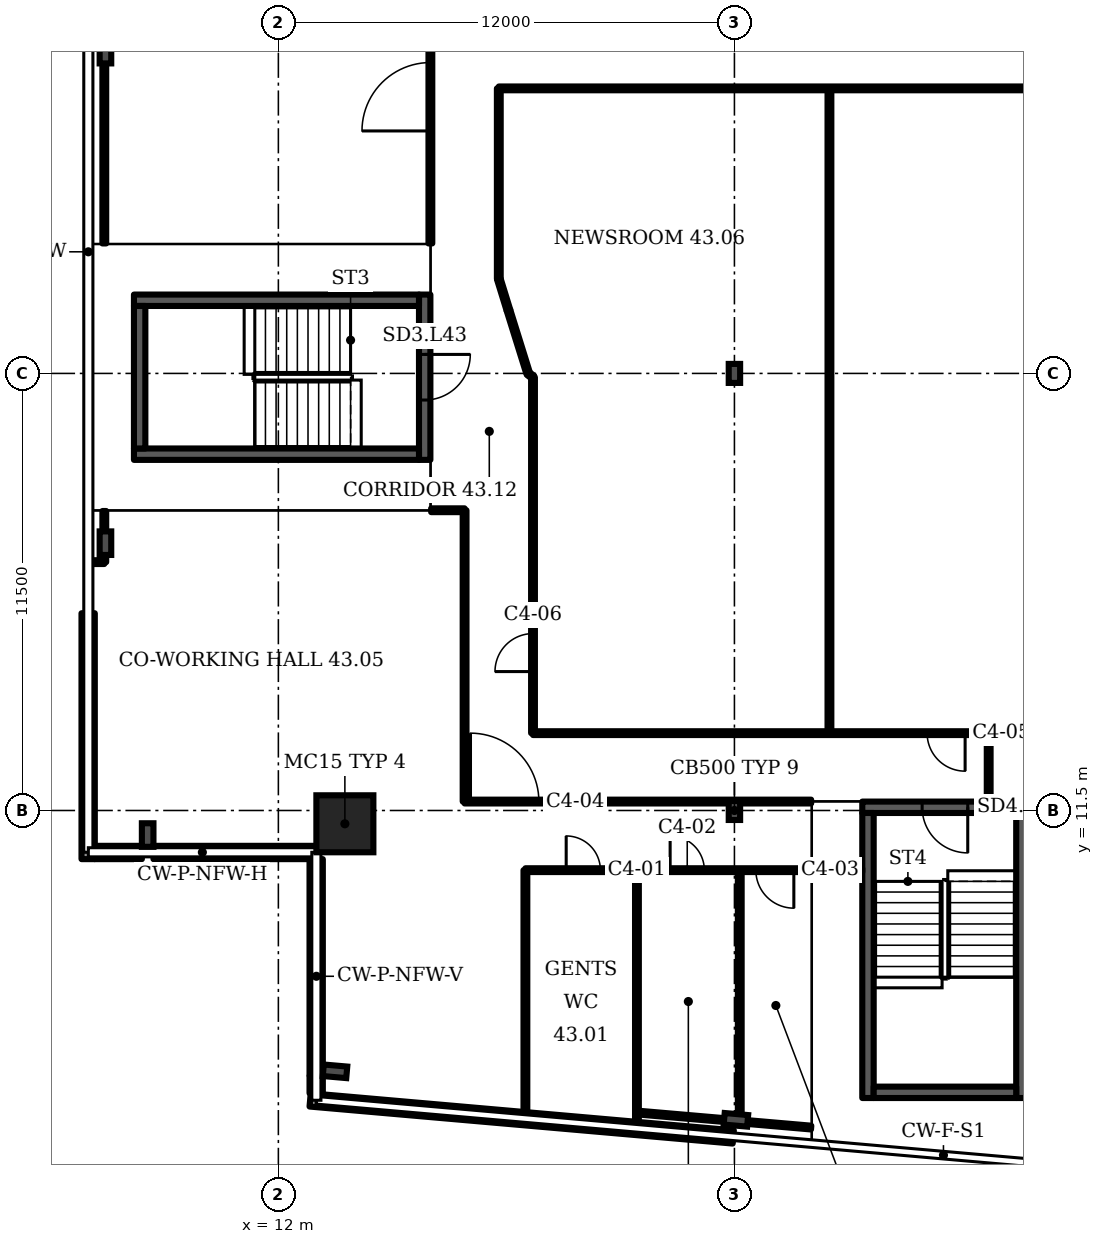
"""IFC4 building model, lengths in metres.
Left out: names, types, materials, properties, quantities, classifications, styles, units other than length and angle.
Written with IfcOpenShell. Run it as: python <this file> out.ifc"""

import sys

from ifc_helpers import new_model, si_unit, direction, frame, frame_2d, origin, origin_2d, place, context, subcontext, project, spatial, rectangle, i_section, extrude, element, fill, save


model = new_model("IFC4")
c1 = context("Model", 3, precision=1e-05, world=origin(), true_north=direction((0.0, 1.0)))
c2 = subcontext(c1, "Body", "Model", "MODEL_VIEW")
j1 = project(units=[si_unit("LENGTHUNIT", "METRE"), si_unit("PLANEANGLEUNIT", "RADIAN")], contexts=[c1])
p1 = place(None, origin())
s1 = spatial("IfcSite", under=j1, at=p1, CompositionType="ELEMENT")
p2 = place(p1, origin())
s2 = spatial("IfcBuilding", under=s1, at=p2, CompositionType="ELEMENT")
p3 = place(p2, frame((0.0, 0.0, 177.1)))
s3 = spatial("IfcBuildingStorey", under=s2, at=p3, CompositionType="ELEMENT", Elevation=177.1)
p4 = place(p3, frame((13.75, 11.15, 0.0), z_axis=(0.0, 0.0, 1.0), x_axis=(1.0, 0.0, 0.0)))
e1 = element("IfcColumn", 1, at=p4, inside=s3, PredefinedType="COLUMN", context=c2, shape_type="SweptSolid", body=[
    extrude(rectangle(XDim=1.5, YDim=1.5, at=origin_2d()), origin(), (0.0, 0.0, 1.0), 3.6),
])
for number, where, z_axis, x_axis in (
    (2, (13.491, 4.637, 0.0), (0.0, 0.0, 1.0), (-0.087, -0.996, 0.0)),
    (3, (24.039, 3.361, 0.0), (0.0, 0.0, 1.0), (-0.087, -0.996, 0.0)),
    (4, (7.45, 31.467, 0.0), (0.0, 0.0, 1.0), (-1.0, 0.0, 0.0)),
    (5, (7.45, 18.533, 0.0), (0.0, 0.0, 1.0), (-1.0, 0.0, 0.0)),
    (6, (8.561, 10.854, 0.0), (0.0, 0.0, 1.0), (-1.0, 0.0, 0.0)),
):
    element("IfcColumn", number, at=place(p3, frame(where, z_axis=z_axis, x_axis=x_axis)), inside=s3, PredefinedType="COLUMN", context=c2, shape_type="SweptSolid", body=[
        extrude(i_section(OverallWidth=0.305, OverallDepth=0.62, WebThickness=0.021, FlangeThickness=0.04, FilletRadius=0.027, at=origin_2d()), origin(), (0.0, 0.0, 1.0), 3.6),
    ])
for number, where, z_axis, x_axis in (
    (7, (24.0, 11.5, 0.0), (0.0, 0.0, 1.0), (1.0, 0.0, 0.0)),
    (8, (24.0, 23.0, 0.0), (0.0, 0.0, 1.0), (1.0, 0.0, 0.0)),
):
    element("IfcColumn", number, at=place(p3, frame(where, z_axis=z_axis, x_axis=x_axis)), inside=s3, PredefinedType="COLUMN", context=c2, shape_type="SweptSolid", body=[
        extrude(i_section(OverallWidth=0.3, OverallDepth=0.5, WebThickness=0.014, FlangeThickness=0.028, FilletRadius=0.027, at=origin_2d()), origin(), (0.0, 0.0, 1.0), 3.6),
    ])
p5 = place(p3, frame((12.835, 3.885, 0.0), z_axis=(0.0, 0.0, 1.0), x_axis=(0.996199, -0.087154, 0.0)))
e9 = element("IfcWall", 9, at=p5, inside=s3, PredefinedType="SOLIDWALL", context=c2, shape_type="SweptSolid", body=[
    extrude(rectangle(XDim=11.177, YDim=0.35, at=frame_2d((5.588, 0.0))), origin(), (0.0, 0.0, 1.0), 1.0),
])
p6 = place(p3, frame((6.995, 16.69, 0.0), z_axis=(0.0, 0.0, 1.0), x_axis=(0.0, -1.0, 0.0)))
e10 = element("IfcWall", 10, at=p6, inside=s3, PredefinedType="SOLIDWALL", context=c2, shape_type="SweptSolid", body=[
    extrude(rectangle(XDim=6.47, YDim=0.35, at=frame_2d((3.235, 0.0))), origin(), (0.0, 0.0, 1.0), 1.0),
])
p7 = place(p3, frame((7.17, 10.395, 0.0), z_axis=(0.0, 0.0, 1.0), x_axis=(1.0, 0.0, 0.0)))
e11 = element("IfcWall", 11, at=p7, inside=s3, PredefinedType="SOLIDWALL", context=c2, shape_type="SweptSolid", body=[
    extrude(rectangle(XDim=1.238, YDim=0.35, at=frame_2d((0.619, 0.0))), origin(), (0.0, 0.0, 1.0), 1.0),
])
p8 = place(p3, frame((8.713, 10.395, 0.0), z_axis=(0.0, 0.0, 1.0), x_axis=(1.0, 0.0, 0.0)))
e12 = element("IfcWall", 12, at=p8, inside=s3, PredefinedType="SOLIDWALL", context=c2, shape_type="SweptSolid", body=[
    extrude(rectangle(XDim=4.287, YDim=0.35, at=frame_2d((2.143, 0.0))), origin(), (0.0, 0.0, 1.0), 1.0),
])
p9 = place(p3, frame((12.995, 10.22, 0.0), z_axis=(0.0, 0.0, 1.0), x_axis=(0.0, -1.0, 0.0)))
e13 = element("IfcWall", 13, at=p9, inside=s3, PredefinedType="SOLIDWALL", context=c2, shape_type="SweptSolid", body=[
    extrude(rectangle(XDim=5.693, YDim=0.35, at=frame_2d((2.847, 0.0))), origin(), (0.0, 0.0, 1.0), 1.0),
])
p10 = place(p3, frame((12.995, 4.512, 0.0), z_axis=(0.0, 0.0, 1.0), x_axis=(0.0, -1.0, 0.0)))
e14 = element("IfcWall", 14, at=p10, inside=s3, PredefinedType="SOLIDWALL", context=c2, shape_type="SweptSolid", body=[
    extrude(rectangle(XDim=0.454, YDim=0.35, at=frame_2d((0.227, 0.0))), origin(), (0.0, 0.0, 1.0), 1.0),
])
p11 = place(p3, frame((15.85, 20.725, 0.0), z_axis=(0.0, 0.0, 1.0), x_axis=(0.0, 1.0, 0.0)))
e15 = element("IfcWall", 15, at=p11, inside=s3, PredefinedType="SHEAR", context=c2, shape_type="SweptSolid", body=[
    extrude(rectangle(XDim=4.35, YDim=0.3, at=frame_2d((2.175, 0.0))), origin(), (0.0, 0.0, 1.0), 3.2),
])
p12 = place(p11, frame((1.575, 0.0, 0.0)))
e16 = element("IfcOpeningElement", 16, at=p12, cuts=e15, PredefinedType="OPENING", context=c2, shape_type="SweptSolid", body=[
    extrude(rectangle(XDim=1.2, YDim=2.1, at=frame_2d((0.6, 1.05))), frame((0.0, 0.16, 0.0), z_axis=(0.0, -1.0, 0.0), x_axis=(1.0, 0.0, 0.0)), (0.0, 0.0, 1.0), 0.32),
])
p13 = place(p3, frame((27.364, 11.584, 0.0), z_axis=(0.0, 0.0, 1.0), x_axis=(1.0, 0.0, 0.0)))
e17 = element("IfcWall", 17, at=p13, inside=s3, PredefinedType="SHEAR", context=c2, shape_type="SweptSolid", body=[
    extrude(rectangle(XDim=4.35, YDim=0.3, at=frame_2d((2.175, 0.0))), origin(), (0.0, 0.0, 1.0), 3.2),
])
p14 = place(p13, frame((1.575, 0.0, 0.0)))
e18 = element("IfcOpeningElement", 18, at=p14, cuts=e17, PredefinedType="OPENING", context=c2, shape_type="SweptSolid", body=[
    extrude(rectangle(XDim=1.2, YDim=2.1, at=frame_2d((0.6, 1.05))), frame((0.0, 0.16, 0.0), z_axis=(0.0, -1.0, 0.0), x_axis=(1.0, 0.0, 0.0)), (0.0, 0.0, 1.0), 0.32),
])
p15 = place(p3, frame((7.02, 18.035, 0.0), z_axis=(0.0, 0.0, 1.0), x_axis=(1.0, 0.0, 0.0)))
e19 = element("IfcWall", 19, at=p15, inside=s3, PredefinedType="PARTITIONING", context=c2, shape_type="SweptSolid", body=[
    extrude(rectangle(XDim=0.4, YDim=0.1, at=frame_2d((0.2, 0.0))), origin(), (0.0, 0.0, 1.0), 3.2),
])
p16 = place(p3, frame((7.42, 18.035, 0.0), z_axis=(0.0, 0.0, 1.0), x_axis=(0.0, 1.0, 0.0)))
e20 = element("IfcWall", 20, at=p16, inside=s3, PredefinedType="PARTITIONING", context=c2, shape_type="SweptSolid", body=[
    extrude(rectangle(XDim=1.345, YDim=0.1, at=frame_2d((0.672, 0.0))), origin(), (0.0, 0.0, 1.0), 2.58),
])
p17 = place(p3, frame((7.42, 26.42, 0.0), z_axis=(0.0, 0.0, 1.0), x_axis=(0.0, 1.0, 0.0)))
e21 = element("IfcWall", 21, at=p17, inside=s3, PredefinedType="PARTITIONING", context=c2, shape_type="SweptSolid", body=[
    extrude(rectangle(XDim=15.56, YDim=0.1, at=frame_2d((7.78, 0.0))), origin(), (0.0, 0.0, 1.0), 2.58),
])
p18 = place(p3, frame((16.0, 26.42, 0.0), z_axis=(0.0, 0.0, 1.0), x_axis=(0.0, 1.0, 0.0)))
e22 = element("IfcWall", 22, at=p18, inside=s3, PredefinedType="PARTITIONING", context=c2, shape_type="SweptSolid", body=[
    extrude(rectangle(XDim=7.56, YDim=0.1, at=frame_2d((3.78, 0.0))), origin(), (0.0, 0.0, 1.0), 3.2),
])
p19 = place(p18, frame((2.96, 0.0, 0.0)))
e23 = element("IfcOpeningElement", 23, at=p19, cuts=e22, PredefinedType="OPENING", context=c2, shape_type="SweptSolid", body=[
    extrude(rectangle(XDim=1.8, YDim=2.1, at=frame_2d((0.9, 1.05))), frame((0.0, 0.06, 0.0), z_axis=(0.0, -1.0, 0.0), x_axis=(1.0, 0.0, 0.0)), (0.0, 0.0, 1.0), 0.12),
])
p20 = place(p3, frame((16.02, 19.4, 0.0), z_axis=(0.0, 0.0, 1.0), x_axis=(1.0, 0.0, 0.0)))
e24 = element("IfcWall", 24, at=p20, inside=s3, PredefinedType="PARTITIONING", context=c2, shape_type="SweptSolid", body=[
    extrude(rectangle(XDim=0.88, YDim=0.1, at=frame_2d((0.44, 0.0))), origin(), (0.0, 0.0, 1.0), 3.2),
])
p21 = place(p3, frame((16.9, 11.735, 0.0), z_axis=(0.0, 0.0, 1.0), x_axis=(0.0, 1.0, 0.0)))
e25 = element("IfcWall", 25, at=p21, inside=s3, PredefinedType="PARTITIONING", context=c2, shape_type="SweptSolid", body=[
    extrude(rectangle(XDim=7.665, YDim=0.1, at=frame_2d((3.833, 0.0))), origin(), (0.0, 0.0, 1.0), 3.2),
])
p22 = place(p3, frame((16.9, 11.735, 0.0), z_axis=(0.0, 0.0, 1.0), x_axis=(1.0, 0.0, 0.0)))
e26 = element("IfcWall", 26, at=p22, inside=s3, PredefinedType="PARTITIONING", context=c2, shape_type="SweptSolid", body=[
    extrude(rectangle(XDim=9.119, YDim=0.1, at=frame_2d((4.56, 0.0))), origin(), (0.0, 0.0, 1.0), 3.2),
])
p23 = place(p22, frame((0.155, 0.0, 0.0)))
e27 = element("IfcOpeningElement", 27, at=p23, cuts=e26, PredefinedType="OPENING", context=c2, shape_type="SweptSolid", body=[
    extrude(rectangle(XDim=1.8, YDim=2.1, at=frame_2d((0.9, 1.05))), frame((0.0, 0.06, 0.0), z_axis=(0.0, -1.0, 0.0), x_axis=(1.0, 0.0, 0.0)), (0.0, 0.0, 1.0), 0.12),
])
p24 = place(p3, frame((17.8, 25.485, 0.0), z_axis=(0.0, 0.0, 1.0), x_axis=(0.0, 1.0, 0.0)))
e28 = element("IfcWall", 28, at=p24, inside=s3, PredefinedType="PARTITIONING", context=c2, shape_type="SweptSolid", body=[
    extrude(rectangle(XDim=5.015, YDim=0.1, at=frame_2d((2.507, 0.0))), origin(), (0.0, 0.0, 1.0), 3.2),
])
p25 = place(p3, frame((17.8, 30.5, 0.0), z_axis=(0.0, 0.0, 1.0), x_axis=(1.0, 0.0, 0.0)))
e29 = element("IfcWall", 29, at=p25, inside=s3, PredefinedType="PARTITIONING", context=c2, shape_type="SweptSolid", body=[
    extrude(rectangle(XDim=19.05, YDim=0.1, at=frame_2d((9.525, 0.0))), origin(), (0.0, 0.0, 1.0), 3.2),
])
p26 = place(p3, frame((18.055, 24.66, 0.0), z_axis=(0.0, 0.0, 1.0), x_axis=(-0.295119, 0.955462, 0.0)))
e30 = element("IfcWall", 30, at=p26, inside=s3, PredefinedType="PARTITIONING", context=c2, shape_type="SweptSolid", body=[
    extrude(rectangle(XDim=0.864, YDim=0.1, at=frame_2d((0.432, 0.0))), origin(), (0.0, 0.0, 1.0), 3.2),
])
p27 = place(p3, frame((18.5, 3.414, 0.0), z_axis=(0.0, 0.0, 1.0), x_axis=(0.0, 1.0, 0.0)))
e31 = element("IfcWall", 31, at=p27, inside=s3, PredefinedType="PARTITIONING", context=c2, shape_type="SweptSolid", body=[
    extrude(rectangle(XDim=6.516, YDim=0.1, at=frame_2d((3.258, 0.0))), origin(), (0.0, 0.0, 1.0), 2.58),
])
p28 = place(p3, frame((18.5, 9.93, 0.0), z_axis=(0.0, 0.0, 1.0), x_axis=(1.0, 0.0, 0.0)))
e32 = element("IfcWall", 32, at=p28, inside=s3, PredefinedType="PARTITIONING", context=c2, shape_type="SweptSolid", body=[
    extrude(rectangle(XDim=8.864, YDim=0.1, at=frame_2d((4.432, 0.0))), origin(), (0.0, 0.0, 1.0), 3.2),
])
p29 = place(p28, frame((1.073, 0.0, 0.0)))
e33 = element("IfcOpeningElement", 33, at=p29, cuts=e32, PredefinedType="OPENING", context=c2, shape_type="SweptSolid", body=[
    extrude(rectangle(XDim=0.9, YDim=2.1, at=frame_2d((0.45, 1.05))), frame((0.0, 0.06, 0.0), z_axis=(0.0, -1.0, 0.0), x_axis=(1.0, 0.0, 0.0)), (0.0, 0.0, 1.0), 0.12),
])
p30 = place(p28, frame((3.808, 0.0, 0.0)))
e34 = element("IfcOpeningElement", 34, at=p30, cuts=e32, PredefinedType="OPENING", context=c2, shape_type="SweptSolid", body=[
    extrude(rectangle(XDim=0.9, YDim=2.1, at=frame_2d((0.45, 1.05))), frame((0.0, 0.06, 0.0), z_axis=(0.0, -1.0, 0.0), x_axis=(1.0, 0.0, 0.0)), (0.0, 0.0, 1.0), 0.12),
])
p31 = place(p28, frame((6.063, 0.0, 0.0)))
e35 = element("IfcOpeningElement", 35, at=p31, cuts=e32, PredefinedType="OPENING", context=c2, shape_type="SweptSolid", body=[
    extrude(rectangle(XDim=1.0, YDim=2.1, at=frame_2d((0.5, 1.05))), frame((0.0, 0.06, 0.0), z_axis=(0.0, -1.0, 0.0), x_axis=(1.0, 0.0, 0.0)), (0.0, 0.0, 1.0), 0.12),
])
p32 = place(p3, frame((18.575, 22.995, 0.0), z_axis=(0.0, 0.0, 1.0), x_axis=(-0.298155, 0.954516, 0.0)))
e36 = element("IfcWall", 36, at=p32, inside=s3, PredefinedType="PARTITIONING", context=c2, shape_type="SweptSolid", body=[
    extrude(rectangle(XDim=1.744, YDim=0.1, at=frame_2d((0.872, 0.0))), origin(), (0.0, 0.0, 1.0), 3.2),
])
p33 = place(p3, frame((18.7, 22.9, 0.0), z_axis=(0.0, 0.0, 1.0), x_axis=(-0.795501, 0.605948, 0.0)))
e37 = element("IfcWall", 37, at=p33, inside=s3, PredefinedType="PARTITIONING", context=c2, shape_type="SweptSolid", body=[
    extrude(rectangle(XDim=0.157, YDim=0.1, at=frame_2d((0.079, 0.0))), origin(), (0.0, 0.0, 1.0), 3.2),
])
p34 = place(p3, frame((18.7, 13.535, 0.0), z_axis=(0.0, 0.0, 1.0), x_axis=(0.0, 1.0, 0.0)))
e38 = element("IfcWall", 38, at=p34, inside=s3, PredefinedType="PARTITIONING", context=c2, shape_type="SweptSolid", body=[
    extrude(rectangle(XDim=9.365, YDim=0.1, at=frame_2d((4.683, 0.0))), origin(), (0.0, 0.0, 1.0), 3.2),
])
p35 = place(p34, frame((1.62, 0.0, 0.0)))
e39 = element("IfcOpeningElement", 39, at=p35, cuts=e38, PredefinedType="OPENING", context=c2, shape_type="SweptSolid", body=[
    extrude(rectangle(XDim=1.0, YDim=2.1, at=frame_2d((0.5, 1.05))), frame((0.0, 0.06, 0.0), z_axis=(0.0, -1.0, 0.0), x_axis=(1.0, 0.0, 0.0)), (0.0, 0.0, 1.0), 0.12),
])
p36 = place(p3, frame((18.7, 13.535, 0.0), z_axis=(0.0, 0.0, 1.0), x_axis=(1.0, 0.0, 0.0)))
e40 = element("IfcWall", 40, at=p36, inside=s3, PredefinedType="PARTITIONING", context=c2, shape_type="SweptSolid", body=[
    extrude(rectangle(XDim=11.99, YDim=0.1, at=frame_2d((5.995, 0.0))), origin(), (0.0, 0.0, 1.0), 3.2),
])
p37 = place(p36, frame((10.37, 0.0, 0.0)))
e41 = element("IfcOpeningElement", 41, at=p37, cuts=e40, PredefinedType="OPENING", context=c2, shape_type="SweptSolid", body=[
    extrude(rectangle(XDim=1.0, YDim=2.1, at=frame_2d((0.5, 1.05))), frame((0.0, 0.06, 0.0), z_axis=(0.0, -1.0, 0.0), x_axis=(1.0, 0.0, 0.0)), (0.0, 0.0, 1.0), 0.12),
])
p38 = place(p3, frame((21.435, 3.165, 0.0), z_axis=(0.0, 0.0, 1.0), x_axis=(0.0, 1.0, 0.0)))
e42 = element("IfcWall", 42, at=p38, inside=s3, PredefinedType="PARTITIONING", context=c2, shape_type="SweptSolid", body=[
    extrude(rectangle(XDim=6.765, YDim=0.1, at=frame_2d((3.382, 0.0))), origin(), (0.0, 0.0, 1.0), 2.58),
])
p39 = place(p3, frame((24.14, 3.32, 0.0), z_axis=(0.0, 0.0, 1.0), x_axis=(0.0, 1.0, 0.0)))
e43 = element("IfcWall", 43, at=p39, inside=s3, PredefinedType="PARTITIONING", context=c2, shape_type="SweptSolid", body=[
    extrude(rectangle(XDim=6.61, YDim=0.1, at=frame_2d((3.305, 0.0))), origin(), (0.0, 0.0, 1.0), 3.2),
])
p40 = place(p3, frame((26.019, 3.157, 0.0), z_axis=(0.0, 0.0, 1.0), x_axis=(-0.996266, 0.086322, 0.0)))
e44 = element("IfcWall", 44, at=p40, inside=s3, PredefinedType="PARTITIONING", context=c2, shape_type="SweptSolid", body=[
    extrude(rectangle(XDim=4.556, YDim=0.1, at=frame_2d((2.278, 0.0))), origin(), (0.0, 0.0, 1.0), 2.58),
])
p41 = place(p3, frame((26.5, 13.535, 0.0), z_axis=(0.0, 0.0, 1.0), x_axis=(0.0, 1.0, 0.0)))
e45 = element("IfcWall", 45, at=p41, inside=s3, PredefinedType="PARTITIONING", context=c2, shape_type="SweptSolid", body=[
    extrude(rectangle(XDim=16.965, YDim=0.1, at=frame_2d((8.482, 0.0))), origin(), (0.0, 0.0, 1.0), 3.2),
])
p42 = place(p3, frame((30.69, 11.754, 0.0), z_axis=(0.0, 0.0, 1.0), x_axis=(0.0, 1.0, 0.0)))
e46 = element("IfcWall", 46, at=p42, inside=s3, PredefinedType="PARTITIONING", context=c2, shape_type="SweptSolid", body=[
    extrude(rectangle(XDim=1.781, YDim=0.1, at=frame_2d((0.89, 0.0))), origin(), (0.0, 0.0, 1.0), 3.2),
])
for number, where, z_axis, x_axis in (
    (47, (8.2, 20.875, 0.0), (0.0, 0.0, 1.0), (1.0, 0.0, 0.0)),
    (48, (8.2, 24.925, 0.0), (0.0, 0.0, 1.0), (1.0, 0.0, 0.0)),
):
    element("IfcWall", number, at=place(p3, frame(where, z_axis=z_axis, x_axis=x_axis)), inside=s3, PredefinedType="SHEAR", context=c2, shape_type="SweptSolid", body=[
        extrude(rectangle(XDim=7.5, YDim=0.3, at=frame_2d((3.75, 0.0))), origin(), (0.0, 0.0, 1.0), 3.2),
    ])
p43 = place(p3, frame((8.35, 21.025, 0.0), z_axis=(0.0, 0.0, 1.0), x_axis=(0.0, 1.0, 0.0)))
e49 = element("IfcWall", 49, at=p43, inside=s3, PredefinedType="SHEAR", context=c2, shape_type="SweptSolid", body=[
    extrude(rectangle(XDim=3.75, YDim=0.3, at=frame_2d((1.875, 0.0))), origin(), (0.0, 0.0, 1.0), 3.2),
])
for number, where, z_axis, x_axis in (
    (50, (27.514, 3.934, 0.0), (0.0, 0.0, 1.0), (0.0, 1.0, 0.0)),
    (51, (31.564, 3.934, 0.0), (0.0, 0.0, 1.0), (0.0, 1.0, 0.0)),
):
    element("IfcWall", number, at=place(p3, frame(where, z_axis=z_axis, x_axis=x_axis)), inside=s3, PredefinedType="SHEAR", context=c2, shape_type="SweptSolid", body=[
        extrude(rectangle(XDim=7.5, YDim=0.3, at=frame_2d((3.75, 0.0))), origin(), (0.0, 0.0, 1.0), 3.2),
    ])
p44 = place(p3, frame((27.664, 4.084, 0.0), z_axis=(0.0, 0.0, 1.0), x_axis=(1.0, 0.0, 0.0)))
e52 = element("IfcWall", 52, at=p44, inside=s3, PredefinedType="SHEAR", context=c2, shape_type="SweptSolid", body=[
    extrude(rectangle(XDim=3.75, YDim=0.3, at=frame_2d((1.875, 0.0))), origin(), (0.0, 0.0, 1.0), 3.2),
])
p45 = place(p12, origin())
e53 = element("IfcDoor", 53, at=p45, inside=s3, OperationType="SINGLE_SWING_RIGHT", PredefinedType="DOOR", context=c2, shape_type="SweptSolid", body=[
    extrude(rectangle(XDim=1.2, YDim=2.1, at=frame_2d((0.6, 1.05))), frame((0.0, 0.025, 0.0), z_axis=(0.0, -1.0, 0.0), x_axis=(1.0, 0.0, 0.0)), (0.0, 0.0, 1.0), 0.05),
])
fill(e16, e53)
p46 = place(p14, origin())
e54 = element("IfcDoor", 54, at=p46, inside=s3, OperationType="SINGLE_SWING_RIGHT", PredefinedType="DOOR", context=c2, shape_type="SweptSolid", body=[
    extrude(rectangle(XDim=1.2, YDim=2.1, at=frame_2d((0.6, 1.05))), frame((0.0, 0.025, 0.0), z_axis=(0.0, -1.0, 0.0), x_axis=(1.0, 0.0, 0.0)), (0.0, 0.0, 1.0), 0.05),
])
fill(e18, e54)
p47 = place(p29, origin())
e55 = element("IfcDoor", 55, at=p47, inside=s3, OperationType="SINGLE_SWING_LEFT", PredefinedType="DOOR", context=c2, shape_type="SweptSolid", body=[
    extrude(rectangle(XDim=0.9, YDim=2.1, at=frame_2d((0.45, 1.05))), frame((0.0, 0.025, 0.0), z_axis=(0.0, -1.0, 0.0), x_axis=(1.0, 0.0, 0.0)), (0.0, 0.0, 1.0), 0.05),
])
fill(e33, e55)
p48 = place(p30, origin())
e56 = element("IfcDoor", 56, at=p48, inside=s3, OperationType="SINGLE_SWING_LEFT", PredefinedType="DOOR", context=c2, shape_type="SweptSolid", body=[
    extrude(rectangle(XDim=0.9, YDim=2.1, at=frame_2d((0.45, 1.05))), frame((0.0, 0.025, 0.0), z_axis=(0.0, -1.0, 0.0), x_axis=(1.0, 0.0, 0.0)), (0.0, 0.0, 1.0), 0.05),
])
fill(e34, e56)
p49 = place(p31, origin())
e57 = element("IfcDoor", 57, at=p49, inside=s3, OperationType="SINGLE_SWING_RIGHT", PredefinedType="DOOR", context=c2, shape_type="SweptSolid", body=[
    extrude(rectangle(XDim=1.0, YDim=2.1, at=frame_2d((0.5, 1.05))), frame((0.0, 0.025, 0.0), z_axis=(0.0, -1.0, 0.0), x_axis=(1.0, 0.0, 0.0)), (0.0, 0.0, 1.0), 0.05),
])
fill(e35, e57)
p50 = place(p23, origin())
e58 = element("IfcDoor", 58, at=p50, inside=s3, OperationType="DOUBLE_DOOR_SINGLE_SWING", PredefinedType="DOOR", context=c2, shape_type="SweptSolid", body=[
    extrude(rectangle(XDim=1.8, YDim=2.1, at=frame_2d((0.9, 1.05))), frame((0.0, 0.025, 0.0), z_axis=(0.0, -1.0, 0.0), x_axis=(1.0, 0.0, 0.0)), (0.0, 0.0, 1.0), 0.05),
])
fill(e27, e58)
p51 = place(p37, origin())
e59 = element("IfcDoor", 59, at=p51, inside=s3, OperationType="SINGLE_SWING_RIGHT", PredefinedType="DOOR", context=c2, shape_type="SweptSolid", body=[
    extrude(rectangle(XDim=1.0, YDim=2.1, at=frame_2d((0.5, 1.05))), frame((0.0, 0.025, 0.0), z_axis=(0.0, -1.0, 0.0), x_axis=(1.0, 0.0, 0.0)), (0.0, 0.0, 1.0), 0.05),
])
fill(e41, e59)
p52 = place(p35, origin())
e60 = element("IfcDoor", 60, at=p52, inside=s3, OperationType="SINGLE_SWING_LEFT", PredefinedType="DOOR", context=c2, shape_type="SweptSolid", body=[
    extrude(rectangle(XDim=1.0, YDim=2.1, at=frame_2d((0.5, 1.05))), frame((0.0, 0.025, 0.0), z_axis=(0.0, -1.0, 0.0), x_axis=(1.0, 0.0, 0.0)), (0.0, 0.0, 1.0), 0.05),
])
fill(e39, e60)
p53 = place(p19, origin())
e61 = element("IfcDoor", 61, at=p53, inside=s3, OperationType="DOUBLE_DOOR_SINGLE_SWING", PredefinedType="DOOR", context=c2, shape_type="SweptSolid", body=[
    extrude(rectangle(XDim=1.8, YDim=2.1, at=frame_2d((0.9, 1.05))), frame((0.0, 0.025, 0.0), z_axis=(0.0, -1.0, 0.0), x_axis=(1.0, 0.0, 0.0)), (0.0, 0.0, 1.0), 0.05),
])
fill(e23, e61)
save(model, sys.argv[1])
